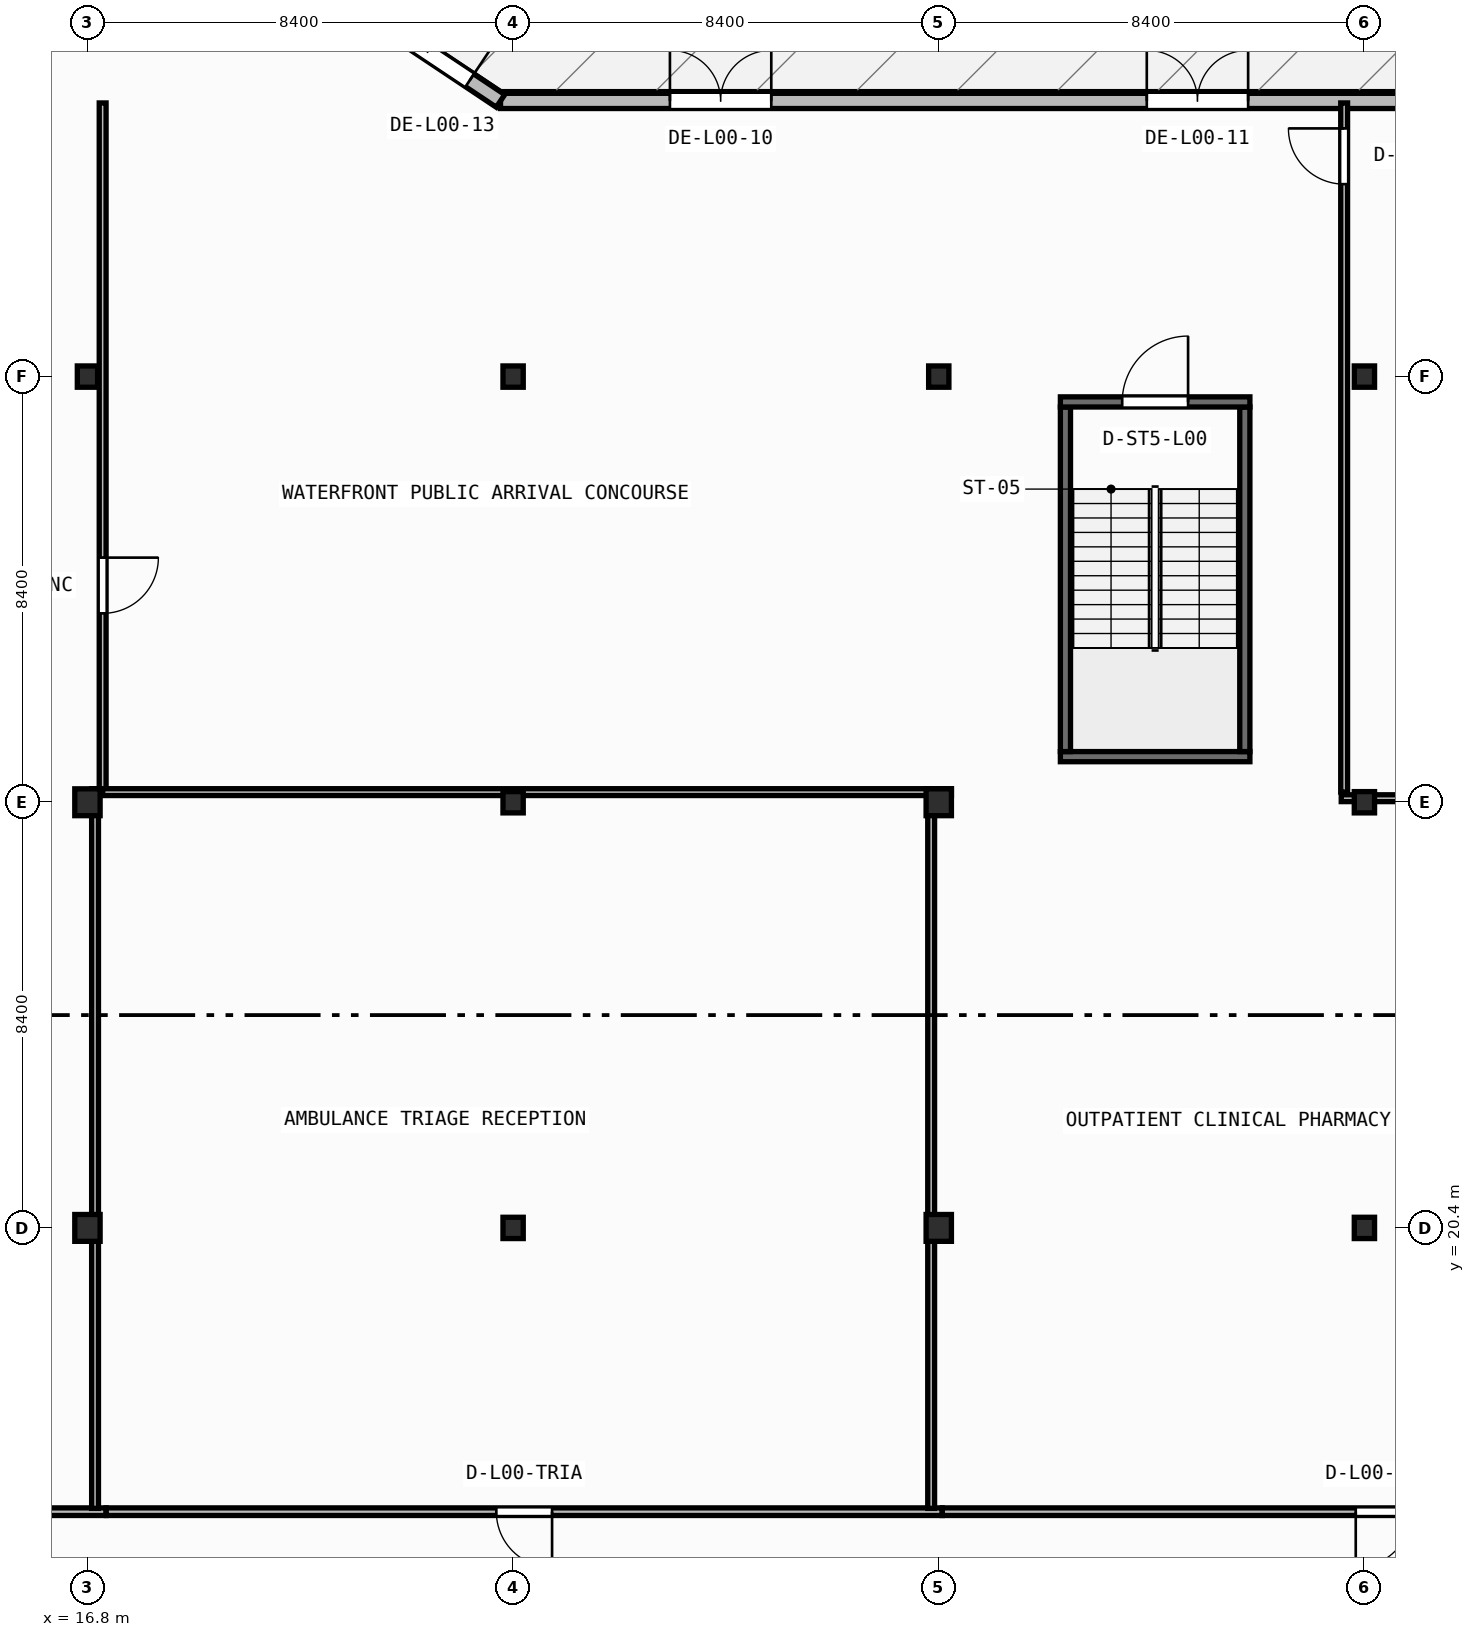
"""IFC4 building model, lengths in metres.
Left out: names, types, materials, properties, quantities, classifications, styles, units other than length and angle.
Written with IfcOpenShell. Run it as: python <this file> out.ifc"""

import sys

from ifc_helpers import new_model, si_unit, direction, frame, frame_2d, origin, origin_2d, place, context, subcontext, project, spatial, rectangle, i_section, extrude, element, fill, save


model = new_model("IFC4")
c1 = context("Model", 3, precision=1e-05, world=origin(), true_north=direction((0.0, 1.0)))
c2 = subcontext(c1, "Body", "Model", "MODEL_VIEW")
j1 = project(units=[si_unit("LENGTHUNIT", "METRE"), si_unit("PLANEANGLEUNIT", "RADIAN")], contexts=[c1])
p1 = place(None, origin())
s1 = spatial("IfcSite", under=j1, at=p1, CompositionType="ELEMENT")
p2 = place(p1, origin())
s2 = spatial("IfcBuilding", under=s1, at=p2, CompositionType="ELEMENT")
p3 = place(p2, origin())
s3 = spatial("IfcBuildingStorey", under=s2, at=p3, CompositionType="ELEMENT", Elevation=0.0)
p4 = place(p3, frame((16.8, 20.4, 0.0), z_axis=(0.0, 0.0, 1.0), x_axis=(1.0, 0.0, 0.0)))
e1 = element("IfcColumn", 1, at=p4, inside=s3, PredefinedType="COLUMN", context=c2, shape_type="SweptSolid", body=[
    extrude(i_section(OverallWidth=0.5, OverallDepth=0.53, WebThickness=0.028, FlangeThickness=0.045, at=origin_2d()), origin(), (0.0, 0.0, 1.0), 4.5),
])
p5 = place(p3, frame((25.2, 20.4, 0.0), z_axis=(0.0, 0.0, 1.0), x_axis=(1.0, 0.0, 0.0)))
e2 = element("IfcColumn", 2, at=p5, inside=s3, PredefinedType="COLUMN", context=c2, shape_type="SweptSolid", body=[
    extrude(i_section(OverallWidth=0.4, OverallDepth=0.42, WebThickness=0.025, FlangeThickness=0.04, at=origin_2d()), origin(), (0.0, 0.0, 1.0), 4.5),
])
p6 = place(p3, frame((33.6, 20.4, 0.0), z_axis=(0.0, 0.0, 1.0), x_axis=(1.0, 0.0, 0.0)))
e3 = element("IfcColumn", 3, at=p6, inside=s3, PredefinedType="COLUMN", context=c2, shape_type="SweptSolid", body=[
    extrude(i_section(OverallWidth=0.5, OverallDepth=0.53, WebThickness=0.028, FlangeThickness=0.045, at=origin_2d()), origin(), (0.0, 0.0, 1.0), 4.5),
])
p7 = place(p3, frame((42.0, 20.4, 0.0), z_axis=(0.0, 0.0, 1.0), x_axis=(1.0, 0.0, 0.0)))
e4 = element("IfcColumn", 4, at=p7, inside=s3, PredefinedType="COLUMN", context=c2, shape_type="SweptSolid", body=[
    extrude(i_section(OverallWidth=0.4, OverallDepth=0.42, WebThickness=0.025, FlangeThickness=0.04, at=origin_2d()), origin(), (0.0, 0.0, 1.0), 4.5),
])
p8 = place(p3, frame((16.8, 28.8, 0.0), z_axis=(0.0, 0.0, 1.0), x_axis=(1.0, 0.0, 0.0)))
e5 = element("IfcColumn", 5, at=p8, inside=s3, PredefinedType="COLUMN", context=c2, shape_type="SweptSolid", body=[
    extrude(i_section(OverallWidth=0.5, OverallDepth=0.53, WebThickness=0.028, FlangeThickness=0.045, at=origin_2d()), origin(), (0.0, 0.0, 1.0), 4.5),
])
p9 = place(p3, frame((25.2, 28.8, 0.0), z_axis=(0.0, 0.0, 1.0), x_axis=(1.0, 0.0, 0.0)))
e6 = element("IfcColumn", 6, at=p9, inside=s3, PredefinedType="COLUMN", context=c2, shape_type="SweptSolid", body=[
    extrude(i_section(OverallWidth=0.4, OverallDepth=0.42, WebThickness=0.025, FlangeThickness=0.04, at=origin_2d()), origin(), (0.0, 0.0, 1.0), 4.5),
])
p10 = place(p3, frame((33.6, 28.8, 0.0), z_axis=(0.0, 0.0, 1.0), x_axis=(1.0, 0.0, 0.0)))
e7 = element("IfcColumn", 7, at=p10, inside=s3, PredefinedType="COLUMN", context=c2, shape_type="SweptSolid", body=[
    extrude(i_section(OverallWidth=0.5, OverallDepth=0.53, WebThickness=0.028, FlangeThickness=0.045, at=origin_2d()), origin(), (0.0, 0.0, 1.0), 4.5),
])
for number, where, z_axis, x_axis in (
    (8, (42.0, 28.8, 0.0), (0.0, 0.0, 1.0), (1.0, 0.0, 0.0)),
    (9, (16.8, 37.2, 0.0), (0.0, 0.0, 1.0), (1.0, 0.0, 0.0)),
    (10, (25.2, 37.2, 0.0), (0.0, 0.0, 1.0), (1.0, 0.0, 0.0)),
    (11, (33.6, 37.2, 0.0), (0.0, 0.0, 1.0), (1.0, 0.0, 0.0)),
    (12, (42.0, 37.2, 0.0), (0.0, 0.0, 1.0), (1.0, 0.0, 0.0)),
):
    element("IfcColumn", number, at=place(p3, frame(where, z_axis=z_axis, x_axis=x_axis)), inside=s3, PredefinedType="COLUMN", context=c2, shape_type="SweptSolid", body=[
        extrude(i_section(OverallWidth=0.4, OverallDepth=0.42, WebThickness=0.025, FlangeThickness=0.04, at=origin_2d()), origin(), (0.0, 0.0, 1.0), 4.5),
    ])
p11 = place(p3, frame((24.952, 42.64, 0.0), z_axis=(0.0, 0.0, 1.0), x_axis=(1.0, 0.0, 0.0)))
e13 = element("IfcWall", 13, at=p11, inside=s3, PredefinedType="STANDARD", context=c2, shape_type="SweptSolid", body=[
    extrude(rectangle(XDim=18.097, YDim=0.3, at=frame_2d((9.048, 0.0))), origin(), (0.0, 0.0, 1.0), 4.25),
])
p12 = place(p11, frame((3.343, 0.0, 0.0)))
e14 = element("IfcOpeningElement", 14, at=p12, cuts=e13, PredefinedType="OPENING", context=c2, shape_type="SweptSolid", body=[
    extrude(rectangle(XDim=2.0, YDim=2.3, at=frame_2d((1.0, 1.15))), frame((0.0, 0.16, 0.0), z_axis=(0.0, -1.0, 0.0), x_axis=(1.0, 0.0, 0.0)), (0.0, 0.0, 1.0), 0.32),
])
p13 = place(p11, frame((12.754, 0.0, 0.0)))
e15 = element("IfcOpeningElement", 15, at=p13, cuts=e13, PredefinedType="OPENING", context=c2, shape_type="SweptSolid", body=[
    extrude(rectangle(XDim=2.0, YDim=2.3, at=frame_2d((1.0, 1.15))), frame((0.0, 0.16, 0.0), z_axis=(0.0, -1.0, 0.0), x_axis=(1.0, 0.0, 0.0)), (0.0, 0.0, 1.0), 0.32),
])
p14 = place(p3, frame((18.952, 46.64, 0.0), z_axis=(0.0, 0.0, 1.0), x_axis=(0.832050294338, -0.554700196225, 0.0)))
e16 = element("IfcWall", 16, at=p14, inside=s3, PredefinedType="STANDARD", context=c2, shape_type="SweptSolid", body=[
    extrude(rectangle(XDim=7.211, YDim=0.3, at=frame_2d((3.605, 0.0))), origin(), (0.0, 0.0, 1.0), 4.25),
])
p15 = place(p14, frame((0.731, 0.0, 0.0)))
e17 = element("IfcOpeningElement", 17, at=p15, cuts=e16, PredefinedType="OPENING", context=c2, shape_type="SweptSolid", body=[
    extrude(rectangle(XDim=2.0, YDim=2.3, at=frame_2d((1.0, 1.15))), frame((0.0, 0.16, 0.0), z_axis=(0.0, -1.0, 0.0), x_axis=(1.0, 0.0, 0.0)), (0.0, 0.0, 1.0), 0.32),
])
p16 = place(p14, frame((4.48, 0.0, 0.0)))
e18 = element("IfcOpeningElement", 18, at=p16, cuts=e16, PredefinedType="OPENING", context=c2, shape_type="SweptSolid", body=[
    extrude(rectangle(XDim=2.0, YDim=2.3, at=frame_2d((1.0, 1.15))), frame((0.0, 0.16, 0.0), z_axis=(0.0, -1.0, 0.0), x_axis=(1.0, 0.0, 0.0)), (0.0, 0.0, 1.0), 0.32),
])
p17 = place(p3, frame((36.0, 29.7, 0.0), z_axis=(0.0, 0.0, 1.0), x_axis=(1.0, 0.0, 0.0)))
e19 = element("IfcWall", 19, at=p17, inside=s3, PredefinedType="SHEAR", context=c2, shape_type="SweptSolid", body=[
    extrude(rectangle(XDim=3.74, YDim=0.2, at=frame_2d((1.87, 0.0))), origin(), (0.0, 0.0, 1.0), 4.25),
])
for number, where, z_axis, x_axis in (
    (20, (36.1, 29.8, 0.0), (0.0, 0.0, 1.0), (0.0, 1.0, 0.0)),
    (21, (39.64, 29.8, 0.0), (0.0, 0.0, 1.0), (0.0, 1.0, 0.0)),
):
    element("IfcWall", number, at=place(p3, frame(where, z_axis=z_axis, x_axis=x_axis)), inside=s3, PredefinedType="SHEAR", context=c2, shape_type="SweptSolid", body=[
        extrude(rectangle(XDim=6.8, YDim=0.2, at=frame_2d((3.4, 0.0))), origin(), (0.0, 0.0, 1.0), 4.25),
    ])
p18 = place(p3, frame((36.0, 36.7, 0.0), z_axis=(0.0, 0.0, 1.0), x_axis=(1.0, 0.0, 0.0)))
e22 = element("IfcWall", 22, at=p18, inside=s3, PredefinedType="SHEAR", context=c2, shape_type="SweptSolid", body=[
    extrude(rectangle(XDim=3.74, YDim=0.2, at=frame_2d((1.87, 0.0))), origin(), (0.0, 0.0, 1.0), 4.25),
])
p19 = place(p18, frame((1.22, 0.0, 0.0)))
e23 = element("IfcOpeningElement", 23, at=p19, cuts=e22, PredefinedType="OPENING", context=c2, shape_type="SweptSolid", body=[
    extrude(rectangle(XDim=1.3, YDim=2.15, at=frame_2d((0.65, 1.075))), frame((0.0, 0.11, 0.0), z_axis=(0.0, -1.0, 0.0), x_axis=(1.0, 0.0, 0.0)), (0.0, 0.0, 1.0), 0.22),
])
p20 = place(p3, frame((17.168, 14.8, 0.0), z_axis=(0.0, 0.0, 1.0), x_axis=(-1.0, 0.0, 0.0)))
e24 = element("IfcWall", 24, at=p20, inside=s3, PredefinedType="PARTITIONING", context=c2, shape_type="SweptSolid", body=[
    extrude(rectangle(XDim=10.076, YDim=0.15, at=frame_2d((5.038, 0.0))), origin(), (0.0, 0.0, 1.0), 4.25),
])
p21 = place(p20, frame((4.488, 0.0, 0.0)))
e25 = element("IfcOpeningElement", 25, at=p21, cuts=e24, PredefinedType="OPENING", context=c2, shape_type="SweptSolid", body=[
    extrude(rectangle(XDim=1.1, YDim=2.1, at=frame_2d((0.55, 1.05))), frame((0.0, 0.085, 0.0), z_axis=(0.0, -1.0, 0.0), x_axis=(1.0, 0.0, 0.0)), (0.0, 0.0, 1.0), 0.17),
])
p22 = place(p3, frame((33.668, 14.8, 0.0), z_axis=(0.0, 0.0, 1.0), x_axis=(-1.0, 0.0, 0.0)))
e26 = element("IfcWall", 26, at=p22, inside=s3, PredefinedType="PARTITIONING", context=c2, shape_type="SweptSolid", body=[
    extrude(rectangle(XDim=16.498, YDim=0.15, at=frame_2d((8.249, 0.0))), origin(), (0.0, 0.0, 1.0), 4.25),
])
p23 = place(p22, frame((7.699, 0.0, 0.0)))
e27 = element("IfcOpeningElement", 27, at=p23, cuts=e26, PredefinedType="OPENING", context=c2, shape_type="SweptSolid", body=[
    extrude(rectangle(XDim=1.1, YDim=2.1, at=frame_2d((0.55, 1.05))), frame((0.0, 0.085, 0.0), z_axis=(0.0, -1.0, 0.0), x_axis=(1.0, 0.0, 0.0)), (0.0, 0.0, 1.0), 0.17),
])
p24 = place(p3, frame((51.088, 14.8, 0.0), z_axis=(0.0, 0.0, 1.0), x_axis=(-1.0, 0.0, 0.0)))
e28 = element("IfcWall", 28, at=p24, inside=s3, PredefinedType="PARTITIONING", context=c2, shape_type="SweptSolid", body=[
    extrude(rectangle(XDim=17.418, YDim=0.15, at=frame_2d((8.709, 0.0))), origin(), (0.0, 0.0, 1.0), 4.25),
])
p25 = place(p24, frame((8.159, 0.0, 0.0)))
e29 = element("IfcOpeningElement", 29, at=p25, cuts=e28, PredefinedType="OPENING", context=c2, shape_type="SweptSolid", body=[
    extrude(rectangle(XDim=1.1, YDim=2.1, at=frame_2d((0.55, 1.05))), frame((0.0, 0.085, 0.0), z_axis=(0.0, -1.0, 0.0), x_axis=(1.0, 0.0, 0.0)), (0.0, 0.0, 1.0), 0.17),
])
p26 = place(p3, frame((17.1, 42.6, 0.0), z_axis=(0.0, 0.0, 1.0), x_axis=(0.0, -1.0, 0.0)))
e30 = element("IfcWall", 30, at=p26, inside=s3, PredefinedType="PARTITIONING", context=c2, shape_type="SweptSolid", body=[
    extrude(rectangle(XDim=13.6, YDim=0.135, at=frame_2d((6.8, 0.0))), origin(), (0.0, 0.0, 1.0), 3.623),
])
p27 = place(p26, frame((8.972, 0.0, 0.0)))
e31 = element("IfcOpeningElement", 31, at=p27, cuts=e30, PredefinedType="OPENING", context=c2, shape_type="SweptSolid", body=[
    extrude(rectangle(XDim=1.1, YDim=2.1, at=frame_2d((0.55, 1.05))), frame((0.0, 0.077, 0.0), z_axis=(0.0, -1.0, 0.0), x_axis=(1.0, 0.0, 0.0)), (0.0, 0.0, 1.0), 0.155),
])
p28 = place(p3, frame((17.1, 29.0, 0.0), z_axis=(0.0, 0.0, 1.0), x_axis=(1.0, 0.0, 0.0)))
e32 = element("IfcWall", 32, at=p28, inside=s3, PredefinedType="PARTITIONING", context=c2, shape_type="SweptSolid", body=[
    extrude(rectangle(XDim=16.75, YDim=0.135, at=frame_2d((8.375, 0.0))), origin(), (0.0, 0.0, 1.0), 3.425),
])
p29 = place(p3, frame((41.6, 29.0, 0.0), z_axis=(0.0, 0.0, 1.0), x_axis=(0.0, 1.0, 0.0)))
e33 = element("IfcWall", 33, at=p29, inside=s3, PredefinedType="PARTITIONING", context=c2, shape_type="SweptSolid", body=[
    extrude(rectangle(XDim=13.6, YDim=0.135, at=frame_2d((6.8, 0.0))), origin(), (0.0, 0.0, 1.0), 3.623),
])
p30 = place(p29, frame((11.998, 0.0, 0.0)))
e34 = element("IfcOpeningElement", 34, at=p30, cuts=e33, PredefinedType="OPENING", context=c2, shape_type="SweptSolid", body=[
    extrude(rectangle(XDim=1.1, YDim=2.1, at=frame_2d((0.55, 1.05))), frame((0.0, 0.077, 0.0), z_axis=(0.0, -1.0, 0.0), x_axis=(1.0, 0.0, 0.0)), (0.0, 0.0, 1.0), 0.155),
])
p31 = place(p3, frame((16.95, 14.865, 0.0), z_axis=(0.0, 0.0, 1.0), x_axis=(0.0, 1.0, 0.0)))
e35 = element("IfcWall", 35, at=p31, inside=s3, PredefinedType="PARTITIONING", context=c2, shape_type="SweptSolid", body=[
    extrude(rectangle(XDim=14.202, YDim=0.135, at=frame_2d((7.101, 0.0))), origin(), (0.0, 0.0, 1.0), 3.623),
])
p32 = place(p3, frame((33.45, 14.865, 0.0), z_axis=(0.0, 0.0, 1.0), x_axis=(0.0, 1.0, 0.0)))
e36 = element("IfcWall", 36, at=p32, inside=s3, PredefinedType="PARTITIONING", context=c2, shape_type="SweptSolid", body=[
    extrude(rectangle(XDim=14.077, YDim=0.135, at=frame_2d((7.039, 0.0))), origin(), (0.0, 0.0, 1.0), 3.623),
])
p33 = place(p3, frame((51.1, 28.88, 0.0), z_axis=(0.0, 0.0, 1.0), x_axis=(-1.0, 0.0, 0.0)))
e37 = element("IfcWall", 37, at=p33, inside=s3, PredefinedType="PARTITIONING", context=c2, shape_type="SweptSolid", body=[
    extrude(rectangle(XDim=9.558, YDim=0.135, at=frame_2d((4.779, 0.0))), origin(), (0.0, 0.0, 1.0), 3.425),
])
p34 = place(p12, origin())
e38 = element("IfcDoor", 38, at=p34, inside=s3, OperationType="DOUBLE_DOOR_SINGLE_SWING", PredefinedType="DOOR", context=c2, shape_type="SweptSolid", body=[
    extrude(rectangle(XDim=2.0, YDim=2.3, at=frame_2d((1.0, 1.15))), frame((0.0, 0.025, 0.0), z_axis=(0.0, -1.0, 0.0), x_axis=(1.0, 0.0, 0.0)), (0.0, 0.0, 1.0), 0.05),
])
fill(e14, e38)
p35 = place(p13, origin())
e39 = element("IfcDoor", 39, at=p35, inside=s3, OperationType="DOUBLE_DOOR_SINGLE_SWING", PredefinedType="DOOR", context=c2, shape_type="SweptSolid", body=[
    extrude(rectangle(XDim=2.0, YDim=2.3, at=frame_2d((1.0, 1.15))), frame((0.0, 0.025, 0.0), z_axis=(0.0, -1.0, 0.0), x_axis=(1.0, 0.0, 0.0)), (0.0, 0.0, 1.0), 0.05),
])
fill(e15, e39)
p36 = place(p16, origin())
e40 = element("IfcDoor", 40, at=p36, inside=s3, OperationType="DOUBLE_DOOR_SINGLE_SWING", PredefinedType="DOOR", context=c2, shape_type="SweptSolid", body=[
    extrude(rectangle(XDim=2.0, YDim=2.3, at=frame_2d((1.0, 1.15))), frame((0.0, 0.025, 0.0), z_axis=(0.0, -1.0, 0.0), x_axis=(1.0, 0.0, 0.0)), (0.0, 0.0, 1.0), 0.05),
])
fill(e18, e40)
p37 = place(p19, origin())
e41 = element("IfcDoor", 41, at=p37, inside=s3, OperationType="SINGLE_SWING_RIGHT", PredefinedType="DOOR", context=c2, shape_type="SweptSolid", body=[
    extrude(rectangle(XDim=1.3, YDim=2.15, at=frame_2d((0.65, 1.075))), frame((0.0, 0.025, 0.0), z_axis=(0.0, -1.0, 0.0), x_axis=(1.0, 0.0, 0.0)), (0.0, 0.0, 1.0), 0.05),
])
fill(e23, e41)
p38 = place(p23, origin())
e42 = element("IfcDoor", 42, at=p38, inside=s3, OperationType="SINGLE_SWING_LEFT", PredefinedType="DOOR", context=c2, shape_type="SweptSolid", body=[
    extrude(rectangle(XDim=1.1, YDim=2.1, at=frame_2d((0.55, 1.05))), frame((0.0, 0.025, 0.0), z_axis=(0.0, -1.0, 0.0), x_axis=(1.0, 0.0, 0.0)), (0.0, 0.0, 1.0), 0.05),
])
fill(e27, e42)
p39 = place(p25, origin())
e43 = element("IfcDoor", 43, at=p39, inside=s3, OperationType="SINGLE_SWING_RIGHT", PredefinedType="DOOR", context=c2, shape_type="SweptSolid", body=[
    extrude(rectangle(XDim=1.1, YDim=2.1, at=frame_2d((0.55, 1.05))), frame((0.0, 0.025, 0.0), z_axis=(0.0, -1.0, 0.0), x_axis=(1.0, 0.0, 0.0)), (0.0, 0.0, 1.0), 0.05),
])
fill(e29, e43)
p40 = place(p27, origin())
e44 = element("IfcDoor", 44, at=p40, inside=s3, OperationType="SINGLE_SWING_LEFT", PredefinedType="DOOR", context=c2, shape_type="SweptSolid", body=[
    extrude(rectangle(XDim=1.1, YDim=2.1, at=frame_2d((0.55, 1.05))), frame((0.0, 0.025, 0.0), z_axis=(0.0, -1.0, 0.0), x_axis=(1.0, 0.0, 0.0)), (0.0, 0.0, 1.0), 0.05),
])
fill(e31, e44)
p41 = place(p30, origin())
e45 = element("IfcDoor", 45, at=p41, inside=s3, OperationType="SINGLE_SWING_RIGHT", PredefinedType="DOOR", context=c2, shape_type="SweptSolid", body=[
    extrude(rectangle(XDim=1.1, YDim=2.1, at=frame_2d((0.55, 1.05))), frame((0.0, 0.025, 0.0), z_axis=(0.0, -1.0, 0.0), x_axis=(1.0, 0.0, 0.0)), (0.0, 0.0, 1.0), 0.05),
])
fill(e34, e45)
save(model, sys.argv[1])
